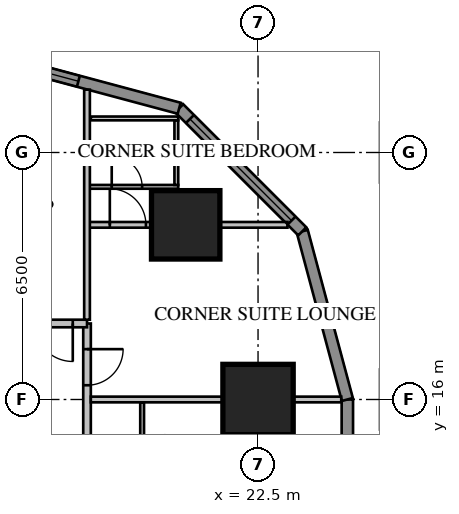
"""IFC4 building model, lengths in metres.
Left out: names, types, materials, properties, quantities, classifications, styles, units other than length and angle.
Written with IfcOpenShell. Run it as: python <this file> out.ifc"""

import sys

from ifc_helpers import new_model, si_unit, direction, frame, frame_2d, origin, origin_2d, place, context, subcontext, project, spatial, rectangle, extrude, element, fill, save


model = new_model("IFC4")
c1 = context("Model", 3, precision=1e-05, world=origin(), true_north=direction((0.0, 1.0)))
c2 = subcontext(c1, "Body", "Model", "MODEL_VIEW")
j1 = project(units=[si_unit("LENGTHUNIT", "METRE"), si_unit("PLANEANGLEUNIT", "RADIAN")], contexts=[c1])
p1 = place(None, origin())
s1 = spatial("IfcSite", under=j1, at=p1, CompositionType="ELEMENT")
p2 = place(p1, origin())
s2 = spatial("IfcBuilding", under=s1, at=p2, CompositionType="ELEMENT")
p3 = place(p2, frame((0.0, 0.0, 46.8)))
s3 = spatial("IfcBuildingStorey", under=s2, at=p3, CompositionType="ELEMENT", Elevation=46.8)
p4 = place(p3, frame((22.5, 16.0, 0.0), z_axis=(0.0, 0.0, 1.0), x_axis=(1.0, 0.0, 0.0)))
e1 = element("IfcColumn", 1, at=p4, inside=s3, PredefinedType="COLUMN", context=c2, shape_type="SweptSolid", body=[
    extrude(rectangle(XDim=1.85, YDim=1.85, at=origin_2d()), origin(), (0.0, 0.0, 1.0), 3.85),
])
p5 = place(p3, frame((20.596, 20.596, 0.0), z_axis=(0.0, 0.0, 1.0), x_axis=(1.0, 0.0, 0.0)))
e2 = element("IfcColumn", 2, at=p5, inside=s3, PredefinedType="COLUMN", context=c2, shape_type="SweptSolid", body=[
    extrude(rectangle(XDim=1.8, YDim=1.8, at=origin_2d()), origin(), (0.0, 0.0, 1.0), 3.85),
])
p6 = place(p3, frame((24.85, -16.0, 0.0), z_axis=(0.0, 0.0, 1.0), x_axis=(0.0, 1.0, 0.0)))
e3 = element("IfcWall", 3, at=p6, inside=s3, PredefinedType="SOLIDWALL", context=c2, shape_type="SweptSolid", body=[
    extrude(rectangle(XDim=32.0, YDim=0.3, at=frame_2d((16.0, 0.0))), origin(), (0.0, 0.0, 1.0), 3.65),
])
p7 = place(p6, frame((1.2, 0.0, 0.75)))
e4 = element("IfcOpeningElement", 4, at=p7, cuts=e3, PredefinedType="OPENING", context=c2, shape_type="SweptSolid", body=[
    extrude(rectangle(XDim=1.6, YDim=1.8, at=frame_2d((0.8, 0.9))), frame((0.0, 0.17, 0.0), z_axis=(0.0, -1.0, 0.0), x_axis=(1.0, 0.0, 0.0)), (0.0, 0.0, 1.0), 0.34),
])
p8 = place(p6, frame((5.2, 0.0, 0.75)))
e5 = element("IfcOpeningElement", 5, at=p8, cuts=e3, PredefinedType="OPENING", context=c2, shape_type="SweptSolid", body=[
    extrude(rectangle(XDim=1.6, YDim=1.8, at=frame_2d((0.8, 0.9))), frame((0.0, 0.17, 0.0), z_axis=(0.0, -1.0, 0.0), x_axis=(1.0, 0.0, 0.0)), (0.0, 0.0, 1.0), 0.34),
])
p9 = place(p6, frame((17.2, 0.0, 0.75)))
e6 = element("IfcOpeningElement", 6, at=p9, cuts=e3, PredefinedType="OPENING", context=c2, shape_type="SweptSolid", body=[
    extrude(rectangle(XDim=1.6, YDim=1.8, at=frame_2d((0.8, 0.9))), frame((0.0, 0.17, 0.0), z_axis=(0.0, -1.0, 0.0), x_axis=(1.0, 0.0, 0.0)), (0.0, 0.0, 1.0), 0.34),
])
p10 = place(p6, frame((21.2, 0.0, 0.75)))
e7 = element("IfcOpeningElement", 7, at=p10, cuts=e3, PredefinedType="OPENING", context=c2, shape_type="SweptSolid", body=[
    extrude(rectangle(XDim=1.6, YDim=1.8, at=frame_2d((0.8, 0.9))), frame((0.0, 0.17, 0.0), z_axis=(0.0, -1.0, 0.0), x_axis=(1.0, 0.0, 0.0)), (0.0, 0.0, 1.0), 0.34),
])
p11 = place(p6, frame((25.2, 0.0, 0.75)))
e8 = element("IfcOpeningElement", 8, at=p11, cuts=e3, PredefinedType="OPENING", context=c2, shape_type="SweptSolid", body=[
    extrude(rectangle(XDim=1.6, YDim=1.8, at=frame_2d((0.8, 0.9))), frame((0.0, 0.17, 0.0), z_axis=(0.0, -1.0, 0.0), x_axis=(1.0, 0.0, 0.0)), (0.0, 0.0, 1.0), 0.34),
])
p12 = place(p6, frame((29.2, 0.0, 0.75)))
e9 = element("IfcOpeningElement", 9, at=p12, cuts=e3, PredefinedType="OPENING", context=c2, shape_type="SweptSolid", body=[
    extrude(rectangle(XDim=1.6, YDim=1.8, at=frame_2d((0.8, 0.9))), frame((0.0, 0.17, 0.0), z_axis=(0.0, -1.0, 0.0), x_axis=(1.0, 0.0, 0.0)), (0.0, 0.0, 1.0), 0.34),
])
p13 = place(p6, frame((8.8, 0.0, 0.75)))
e10 = element("IfcOpeningElement", 10, at=p13, cuts=e3, PredefinedType="OPENING", context=c2, shape_type="SweptSolid", body=[
    extrude(rectangle(XDim=2.4, YDim=1.8, at=frame_2d((1.2, 0.9))), frame((0.0, 0.17, 0.0), z_axis=(0.0, -1.0, 0.0), x_axis=(1.0, 0.0, 0.0)), (0.0, 0.0, 1.0), 0.34),
])
p14 = place(p6, frame((13.812, 0.0, 0.0)))
e11 = element("IfcOpeningElement", 11, at=p14, cuts=e3, PredefinedType="OPENING", context=c2, shape_type="SweptSolid", body=[
    extrude(rectangle(XDim=1.0, YDim=2.4, at=frame_2d((0.5, 1.2))), frame((0.0, 0.17, 0.0), z_axis=(0.0, -1.0, 0.0), x_axis=(1.0, 0.0, 0.0)), (0.0, 0.0, 1.0), 0.34),
])
p15 = place(p3, frame((24.85, 16.0, 0.0), z_axis=(0.0, 0.0, 1.0), x_axis=(-0.258839972501, 0.965920218567, 0.0)))
e12 = element("IfcWall", 12, at=p15, inside=s3, PredefinedType="SOLIDWALL", context=c2, shape_type="SweptSolid", body=[
    extrude(rectangle(XDim=4.581, YDim=0.3, at=frame_2d((2.291, 0.0))), origin(), (0.0, 0.0, 1.0), 3.65),
])
p16 = place(p3, frame((23.664, 20.425, 0.0), z_axis=(0.0, 0.0, 1.0), x_axis=(-0.707106781187, 0.707106781187, 0.0)))
e13 = element("IfcWall", 13, at=p16, inside=s3, PredefinedType="SOLIDWALL", context=c2, shape_type="SweptSolid", body=[
    extrude(rectangle(XDim=4.581, YDim=0.3, at=frame_2d((2.291, 0.0))), origin(), (0.0, 0.0, 1.0), 3.65),
])
p17 = place(p16, frame((0.4, 0.0, 0.75)))
e14 = element("IfcOpeningElement", 14, at=p17, cuts=e13, PredefinedType="OPENING", context=c2, shape_type="SweptSolid", body=[
    extrude(rectangle(XDim=3.781, YDim=1.8, at=frame_2d((1.891, 0.9))), frame((0.0, 0.17, 0.0), z_axis=(0.0, -1.0, 0.0), x_axis=(1.0, 0.0, 0.0)), (0.0, 0.0, 1.0), 0.34),
])
p18 = place(p3, frame((20.425, 23.664, 0.0), z_axis=(0.0, 0.0, 1.0), x_axis=(-0.965920218567, 0.258839972501, 0.0)))
e15 = element("IfcWall", 15, at=p18, inside=s3, PredefinedType="SOLIDWALL", context=c2, shape_type="SweptSolid", body=[
    extrude(rectangle(XDim=4.581, YDim=0.3, at=frame_2d((2.291, 0.0))), origin(), (0.0, 0.0, 1.0), 3.65),
])
p19 = place(p18, frame((2.746, 0.0, 0.75)))
e16 = element("IfcOpeningElement", 16, at=p19, cuts=e15, PredefinedType="OPENING", context=c2, shape_type="SweptSolid", body=[
    extrude(rectangle(XDim=1.6, YDim=1.8, at=frame_2d((0.8, 0.9))), frame((0.0, 0.17, 0.0), z_axis=(0.0, -1.0, 0.0), x_axis=(1.0, 0.0, 0.0)), (0.0, 0.0, 1.0), 0.34),
])
p20 = place(p3, frame((18.0, -18.0, 0.0), z_axis=(0.0, 0.0, 1.0), x_axis=(0.0, 1.0, 0.0)))
e17 = element("IfcWall", 17, at=p20, inside=s3, PredefinedType="PARTITIONING", context=c2, shape_type="SweptSolid", body=[
    extrude(rectangle(XDim=36.0, YDim=0.2, at=frame_2d((18.0, 0.0))), origin(), (0.0, 0.0, 1.0), 3.65),
])
p21 = place(p20, frame((10.4, 0.0, 0.0)))
e18 = element("IfcOpeningElement", 18, at=p21, cuts=e17, PredefinedType="OPENING", context=c2, shape_type="SweptSolid", body=[
    extrude(rectangle(XDim=1.0, YDim=2.1, at=frame_2d((0.5, 1.05))), frame((0.0, 0.12, 0.0), z_axis=(0.0, -1.0, 0.0), x_axis=(1.0, 0.0, 0.0)), (0.0, 0.0, 1.0), 0.24),
])
p22 = place(p20, frame((14.4, 0.0, 0.0)))
e19 = element("IfcOpeningElement", 19, at=p22, cuts=e17, PredefinedType="OPENING", context=c2, shape_type="SweptSolid", body=[
    extrude(rectangle(XDim=1.0, YDim=2.1, at=frame_2d((0.5, 1.05))), frame((0.0, 0.12, 0.0), z_axis=(0.0, -1.0, 0.0), x_axis=(1.0, 0.0, 0.0)), (0.0, 0.0, 1.0), 0.24),
])
p23 = place(p20, frame((0.375, 0.0, 0.0)))
e20 = element("IfcOpeningElement", 20, at=p23, cuts=e17, PredefinedType="OPENING", context=c2, shape_type="SweptSolid", body=[
    extrude(rectangle(XDim=1.0, YDim=2.1, at=frame_2d((0.5, 1.05))), frame((0.0, 0.12, 0.0), z_axis=(0.0, -1.0, 0.0), x_axis=(1.0, 0.0, 0.0)), (0.0, 0.0, 1.0), 0.24),
])
p24 = place(p20, frame((34.375, 0.0, 0.0)))
e21 = element("IfcOpeningElement", 21, at=p24, cuts=e17, PredefinedType="OPENING", context=c2, shape_type="SweptSolid", body=[
    extrude(rectangle(XDim=0.95, YDim=2.1, at=frame_2d((0.475, 1.05))), frame((0.0, 0.12, 0.0), z_axis=(0.0, -1.0, 0.0), x_axis=(1.0, 0.0, 0.0)), (0.0, 0.0, 1.0), 0.24),
])
p25 = place(p3, frame((19.45, -3.925, 0.0), z_axis=(0.0, 0.0, 1.0), x_axis=(0.0, 1.0, 0.0)))
e22 = element("IfcWall", 22, at=p25, inside=s3, PredefinedType="PARTITIONING", context=c2, shape_type="SweptSolid", body=[
    extrude(rectangle(XDim=19.85, YDim=0.1, at=frame_2d((9.925, 0.0))), origin(), (0.0, 0.0, 1.0), 3.65),
])
p26 = place(p25, frame((2.125, 0.0, 0.0)))
e23 = element("IfcOpeningElement", 23, at=p26, cuts=e22, PredefinedType="OPENING", context=c2, shape_type="SweptSolid", body=[
    extrude(rectangle(XDim=1.0, YDim=2.1, at=frame_2d((0.5, 1.05))), frame((0.0, 0.07, 0.0), z_axis=(0.0, -1.0, 0.0), x_axis=(1.0, 0.0, 0.0)), (0.0, 0.0, 1.0), 0.14),
])
p27 = place(p25, frame((0.3, 0.0, 0.0)))
e24 = element("IfcOpeningElement", 24, at=p27, cuts=e22, PredefinedType="OPENING", context=c2, shape_type="SweptSolid", body=[
    extrude(rectangle(XDim=0.8, YDim=2.1, at=frame_2d((0.4, 1.05))), frame((0.0, 0.07, 0.0), z_axis=(0.0, -1.0, 0.0), x_axis=(1.0, 0.0, 0.0)), (0.0, 0.0, 1.0), 0.14),
])
p28 = place(p25, frame((4.3, 0.0, 0.0)))
e25 = element("IfcOpeningElement", 25, at=p28, cuts=e22, PredefinedType="OPENING", context=c2, shape_type="SweptSolid", body=[
    extrude(rectangle(XDim=0.95, YDim=2.1, at=frame_2d((0.475, 1.05))), frame((0.0, 0.07, 0.0), z_axis=(0.0, -1.0, 0.0), x_axis=(1.0, 0.0, 0.0)), (0.0, 0.0, 1.0), 0.14),
])
p29 = place(p25, frame((8.3, 0.0, 0.0)))
e26 = element("IfcOpeningElement", 26, at=p29, cuts=e22, PredefinedType="OPENING", context=c2, shape_type="SweptSolid", body=[
    extrude(rectangle(XDim=0.95, YDim=2.1, at=frame_2d((0.475, 1.05))), frame((0.0, 0.07, 0.0), z_axis=(0.0, -1.0, 0.0), x_axis=(1.0, 0.0, 0.0)), (0.0, 0.0, 1.0), 0.14),
])
p30 = place(p25, frame((12.3, 0.0, 0.0)))
e27 = element("IfcOpeningElement", 27, at=p30, cuts=e22, PredefinedType="OPENING", context=c2, shape_type="SweptSolid", body=[
    extrude(rectangle(XDim=0.95, YDim=2.1, at=frame_2d((0.475, 1.05))), frame((0.0, 0.07, 0.0), z_axis=(0.0, -1.0, 0.0), x_axis=(1.0, 0.0, 0.0)), (0.0, 0.0, 1.0), 0.14),
])
p31 = place(p25, frame((16.3, 0.0, 0.0)))
e28 = element("IfcOpeningElement", 28, at=p31, cuts=e22, PredefinedType="OPENING", context=c2, shape_type="SweptSolid", body=[
    extrude(rectangle(XDim=0.95, YDim=2.1, at=frame_2d((0.475, 1.05))), frame((0.0, 0.07, 0.0), z_axis=(0.0, -1.0, 0.0), x_axis=(1.0, 0.0, 0.0)), (0.0, 0.0, 1.0), 0.14),
])
p32 = place(p3, frame((18.1, 16.0, 0.0), z_axis=(0.0, 0.0, 1.0), x_axis=(1.0, 0.0, 0.0)))
e29 = element("IfcWall", 29, at=p32, inside=s3, PredefinedType="PARTITIONING", context=c2, shape_type="SweptSolid", body=[
    extrude(rectangle(XDim=6.589, YDim=0.15, at=frame_2d((3.295, 0.0))), origin(), (0.0, 0.0, 1.0), 3.65),
])
p33 = place(p3, frame((21.95, 14.325, 0.0), z_axis=(0.0, 0.0, 1.0), x_axis=(0.0, 1.0, 0.0)))
e30 = element("IfcWall", 30, at=p33, inside=s3, PredefinedType="PARTITIONING", context=c2, shape_type="SweptSolid", body=[
    extrude(rectangle(XDim=1.6, YDim=0.1, at=frame_2d((0.8, 0.0))), origin(), (0.0, 0.0, 1.0), 3.65),
])
p34 = place(p3, frame((18.065, 21.596, 0.0), z_axis=(0.0, 0.0, 1.0), x_axis=(1.0, 0.0, 0.0)))
e31 = element("IfcWall", 31, at=p34, inside=s3, PredefinedType="PARTITIONING", context=c2, shape_type="SweptSolid", body=[
    extrude(rectangle(XDim=2.335, YDim=0.1, at=frame_2d((1.167, 0.0))), origin(), (0.0, 0.0, 1.0), 3.65),
])
p35 = place(p34, frame((0.585, 0.0, 0.0)))
e32 = element("IfcOpeningElement", 32, at=p35, cuts=e31, PredefinedType="OPENING", context=c2, shape_type="SweptSolid", body=[
    extrude(rectangle(XDim=0.8, YDim=2.1, at=frame_2d((0.4, 1.05))), frame((0.0, 0.07, 0.0), z_axis=(0.0, -1.0, 0.0), x_axis=(1.0, 0.0, 0.0)), (0.0, 0.0, 1.0), 0.14),
])
p36 = place(p3, frame((20.35, 21.646, 0.0), z_axis=(0.0, 0.0, 1.0), x_axis=(0.0, 1.0, 0.0)))
e33 = element("IfcWall", 33, at=p36, inside=s3, PredefinedType="PARTITIONING", context=c2, shape_type="SweptSolid", body=[
    extrude(rectangle(XDim=1.7, YDim=0.1, at=frame_2d((0.85, 0.0))), origin(), (0.0, 0.0, 1.0), 3.65),
])
p37 = place(p3, frame((18.1, 23.396, 0.0), z_axis=(0.0, 0.0, 1.0), x_axis=(1.0, 0.0, 0.0)))
e34 = element("IfcWall", 34, at=p37, inside=s3, PredefinedType="PARTITIONING", context=c2, shape_type="SweptSolid", body=[
    extrude(rectangle(XDim=2.3, YDim=0.1, at=frame_2d((1.15, 0.0))), origin(), (0.0, 0.0, 1.0), 3.65),
])
p38 = place(p3, frame((18.065, 20.596, 0.0), z_axis=(0.0, 0.0, 1.0), x_axis=(1.0, 0.0, 0.0)))
e35 = element("IfcWall", 35, at=p38, inside=s3, PredefinedType="PARTITIONING", context=c2, shape_type="SweptSolid", body=[
    extrude(rectangle(XDim=5.209, YDim=0.15, at=frame_2d((2.604, 0.0))), origin(), (0.0, 0.0, 1.0), 3.65),
])
p39 = place(p38, frame((0.535, 0.0, 0.0)))
e36 = element("IfcOpeningElement", 36, at=p39, cuts=e35, PredefinedType="OPENING", context=c2, shape_type="SweptSolid", body=[
    extrude(rectangle(XDim=0.95, YDim=2.1, at=frame_2d((0.475, 1.05))), frame((0.0, 0.095, 0.0), z_axis=(0.0, -1.0, 0.0), x_axis=(1.0, 0.0, 0.0)), (0.0, 0.0, 1.0), 0.19),
])
p40 = place(p3, frame((18.0, 18.0, 0.0), z_axis=(0.0, 0.0, 1.0), x_axis=(-1.0, 0.0, 0.0)))
e37 = element("IfcWall", 37, at=p40, inside=s3, PredefinedType="PARTITIONING", context=c2, shape_type="SweptSolid", body=[
    extrude(rectangle(XDim=36.0, YDim=0.2, at=frame_2d((18.0, 0.0))), origin(), (0.0, 0.0, 1.0), 3.65),
])
p41 = place(p40, frame((0.375, 0.0, 0.0)))
e38 = element("IfcOpeningElement", 38, at=p41, cuts=e37, PredefinedType="OPENING", context=c2, shape_type="SweptSolid", body=[
    extrude(rectangle(XDim=1.0, YDim=2.1, at=frame_2d((0.5, 1.05))), frame((0.0, 0.12, 0.0), z_axis=(0.0, -1.0, 0.0), x_axis=(1.0, 0.0, 0.0)), (0.0, 0.0, 1.0), 0.24),
])
p42 = place(p40, frame((3.95, 0.0, 0.0)))
e39 = element("IfcOpeningElement", 39, at=p42, cuts=e37, PredefinedType="OPENING", context=c2, shape_type="SweptSolid", body=[
    extrude(rectangle(XDim=0.95, YDim=2.1, at=frame_2d((0.475, 1.05))), frame((0.0, 0.12, 0.0), z_axis=(0.0, -1.0, 0.0), x_axis=(1.0, 0.0, 0.0)), (0.0, 0.0, 1.0), 0.24),
])
p43 = place(p40, frame((7.95, 0.0, 0.0)))
e40 = element("IfcOpeningElement", 40, at=p43, cuts=e37, PredefinedType="OPENING", context=c2, shape_type="SweptSolid", body=[
    extrude(rectangle(XDim=0.95, YDim=2.1, at=frame_2d((0.475, 1.05))), frame((0.0, 0.12, 0.0), z_axis=(0.0, -1.0, 0.0), x_axis=(1.0, 0.0, 0.0)), (0.0, 0.0, 1.0), 0.24),
])
p44 = place(p40, frame((19.95, 0.0, 0.0)))
e41 = element("IfcOpeningElement", 41, at=p44, cuts=e37, PredefinedType="OPENING", context=c2, shape_type="SweptSolid", body=[
    extrude(rectangle(XDim=0.95, YDim=2.1, at=frame_2d((0.475, 1.05))), frame((0.0, 0.12, 0.0), z_axis=(0.0, -1.0, 0.0), x_axis=(1.0, 0.0, 0.0)), (0.0, 0.0, 1.0), 0.24),
])
p45 = place(p40, frame((23.95, 0.0, 0.0)))
e42 = element("IfcOpeningElement", 42, at=p45, cuts=e37, PredefinedType="OPENING", context=c2, shape_type="SweptSolid", body=[
    extrude(rectangle(XDim=0.95, YDim=2.1, at=frame_2d((0.475, 1.05))), frame((0.0, 0.12, 0.0), z_axis=(0.0, -1.0, 0.0), x_axis=(1.0, 0.0, 0.0)), (0.0, 0.0, 1.0), 0.24),
])
p46 = place(p40, frame((27.95, 0.0, 0.0)))
e43 = element("IfcOpeningElement", 43, at=p46, cuts=e37, PredefinedType="OPENING", context=c2, shape_type="SweptSolid", body=[
    extrude(rectangle(XDim=0.95, YDim=2.1, at=frame_2d((0.475, 1.05))), frame((0.0, 0.12, 0.0), z_axis=(0.0, -1.0, 0.0), x_axis=(1.0, 0.0, 0.0)), (0.0, 0.0, 1.0), 0.24),
])
p47 = place(p40, frame((31.95, 0.0, 0.0)))
e44 = element("IfcOpeningElement", 44, at=p47, cuts=e37, PredefinedType="OPENING", context=c2, shape_type="SweptSolid", body=[
    extrude(rectangle(XDim=0.95, YDim=2.1, at=frame_2d((0.475, 1.05))), frame((0.0, 0.12, 0.0), z_axis=(0.0, -1.0, 0.0), x_axis=(1.0, 0.0, 0.0)), (0.0, 0.0, 1.0), 0.24),
])
p48 = place(p40, frame((34.375, 0.0, 0.0)))
e45 = element("IfcOpeningElement", 45, at=p48, cuts=e37, PredefinedType="OPENING", context=c2, shape_type="SweptSolid", body=[
    extrude(rectangle(XDim=0.95, YDim=2.1, at=frame_2d((0.475, 1.05))), frame((0.0, 0.12, 0.0), z_axis=(0.0, -1.0, 0.0), x_axis=(1.0, 0.0, 0.0)), (0.0, 0.0, 1.0), 0.24),
])
p49 = place(p40, frame((11.2, 0.0, 0.0)))
e46 = element("IfcOpeningElement", 46, at=p49, cuts=e37, PredefinedType="OPENING", context=c2, shape_type="SweptSolid", body=[
    extrude(rectangle(XDim=1.0, YDim=2.1, at=frame_2d((0.5, 1.05))), frame((0.0, 0.12, 0.0), z_axis=(0.0, -1.0, 0.0), x_axis=(1.0, 0.0, 0.0)), (0.0, 0.0, 1.0), 0.24),
])
p50 = place(p40, frame((15.2, 0.0, 0.0)))
e47 = element("IfcOpeningElement", 47, at=p50, cuts=e37, PredefinedType="OPENING", context=c2, shape_type="SweptSolid", body=[
    extrude(rectangle(XDim=1.0, YDim=2.1, at=frame_2d((0.5, 1.05))), frame((0.0, 0.12, 0.0), z_axis=(0.0, -1.0, 0.0), x_axis=(1.0, 0.0, 0.0)), (0.0, 0.0, 1.0), 0.24),
])
p51 = place(p3, frame((18.0, 18.1, 0.0), z_axis=(0.0, 0.0, 1.0), x_axis=(0.0, 1.0, 0.0)))
e48 = element("IfcWall", 48, at=p51, inside=s3, PredefinedType="PARTITIONING", context=c2, shape_type="SweptSolid", body=[
    extrude(rectangle(XDim=6.053, YDim=0.15, at=frame_2d((3.027, 0.0))), origin(), (0.0, 0.0, 1.0), 3.65),
])
p52 = place(p17, origin())
e49 = element("IfcWindow", 49, at=p52, inside=s3, PartitioningType="SINGLE_PANEL", PredefinedType="WINDOW", context=c2, shape_type="SweptSolid", body=[
    extrude(rectangle(XDim=3.781, YDim=1.8, at=frame_2d((1.891, 0.9))), frame((0.0, 0.03, 0.0), z_axis=(0.0, -1.0, 0.0), x_axis=(1.0, 0.0, 0.0)), (0.0, 0.0, 1.0), 0.06),
])
fill(e14, e49)
p53 = place(p19, origin())
e50 = element("IfcWindow", 50, at=p53, inside=s3, PartitioningType="SINGLE_PANEL", PredefinedType="WINDOW", context=c2, shape_type="SweptSolid", body=[
    extrude(rectangle(XDim=1.6, YDim=1.8, at=frame_2d((0.8, 0.9))), frame((0.0, 0.03, 0.0), z_axis=(0.0, -1.0, 0.0), x_axis=(1.0, 0.0, 0.0)), (0.0, 0.0, 1.0), 0.06),
])
fill(e16, e50)
p54 = place(p24, origin())
e51 = element("IfcDoor", 51, at=p54, inside=s3, OperationType="SINGLE_SWING_RIGHT", PredefinedType="DOOR", context=c2, shape_type="SweptSolid", body=[
    extrude(rectangle(XDim=0.95, YDim=2.1, at=frame_2d((0.475, 1.05))), frame((0.0, 0.025, 0.0), z_axis=(0.0, -1.0, 0.0), x_axis=(1.0, 0.0, 0.0)), (0.0, 0.0, 1.0), 0.05),
])
fill(e21, e51)
p55 = place(p35, origin())
e52 = element("IfcDoor", 52, at=p55, inside=s3, OperationType="SINGLE_SWING_LEFT", PredefinedType="DOOR", context=c2, shape_type="SweptSolid", body=[
    extrude(rectangle(XDim=0.8, YDim=2.1, at=frame_2d((0.4, 1.05))), frame((0.0, 0.025, 0.0), z_axis=(0.0, -1.0, 0.0), x_axis=(1.0, 0.0, 0.0)), (0.0, 0.0, 1.0), 0.05),
])
fill(e32, e52)
p56 = place(p39, origin())
e53 = element("IfcDoor", 53, at=p56, inside=s3, OperationType="SINGLE_SWING_LEFT", PredefinedType="DOOR", context=c2, shape_type="SweptSolid", body=[
    extrude(rectangle(XDim=0.95, YDim=2.1, at=frame_2d((0.475, 1.05))), frame((0.0, 0.025, 0.0), z_axis=(0.0, -1.0, 0.0), x_axis=(1.0, 0.0, 0.0)), (0.0, 0.0, 1.0), 0.05),
])
fill(e36, e53)
p57 = place(p41, origin())
e54 = element("IfcDoor", 54, at=p57, inside=s3, OperationType="SINGLE_SWING_LEFT", PredefinedType="DOOR", context=c2, shape_type="SweptSolid", body=[
    extrude(rectangle(XDim=1.0, YDim=2.1, at=frame_2d((0.5, 1.05))), frame((0.0, 0.025, 0.0), z_axis=(0.0, -1.0, 0.0), x_axis=(1.0, 0.0, 0.0)), (0.0, 0.0, 1.0), 0.05),
])
fill(e38, e54)
save(model, sys.argv[1])
